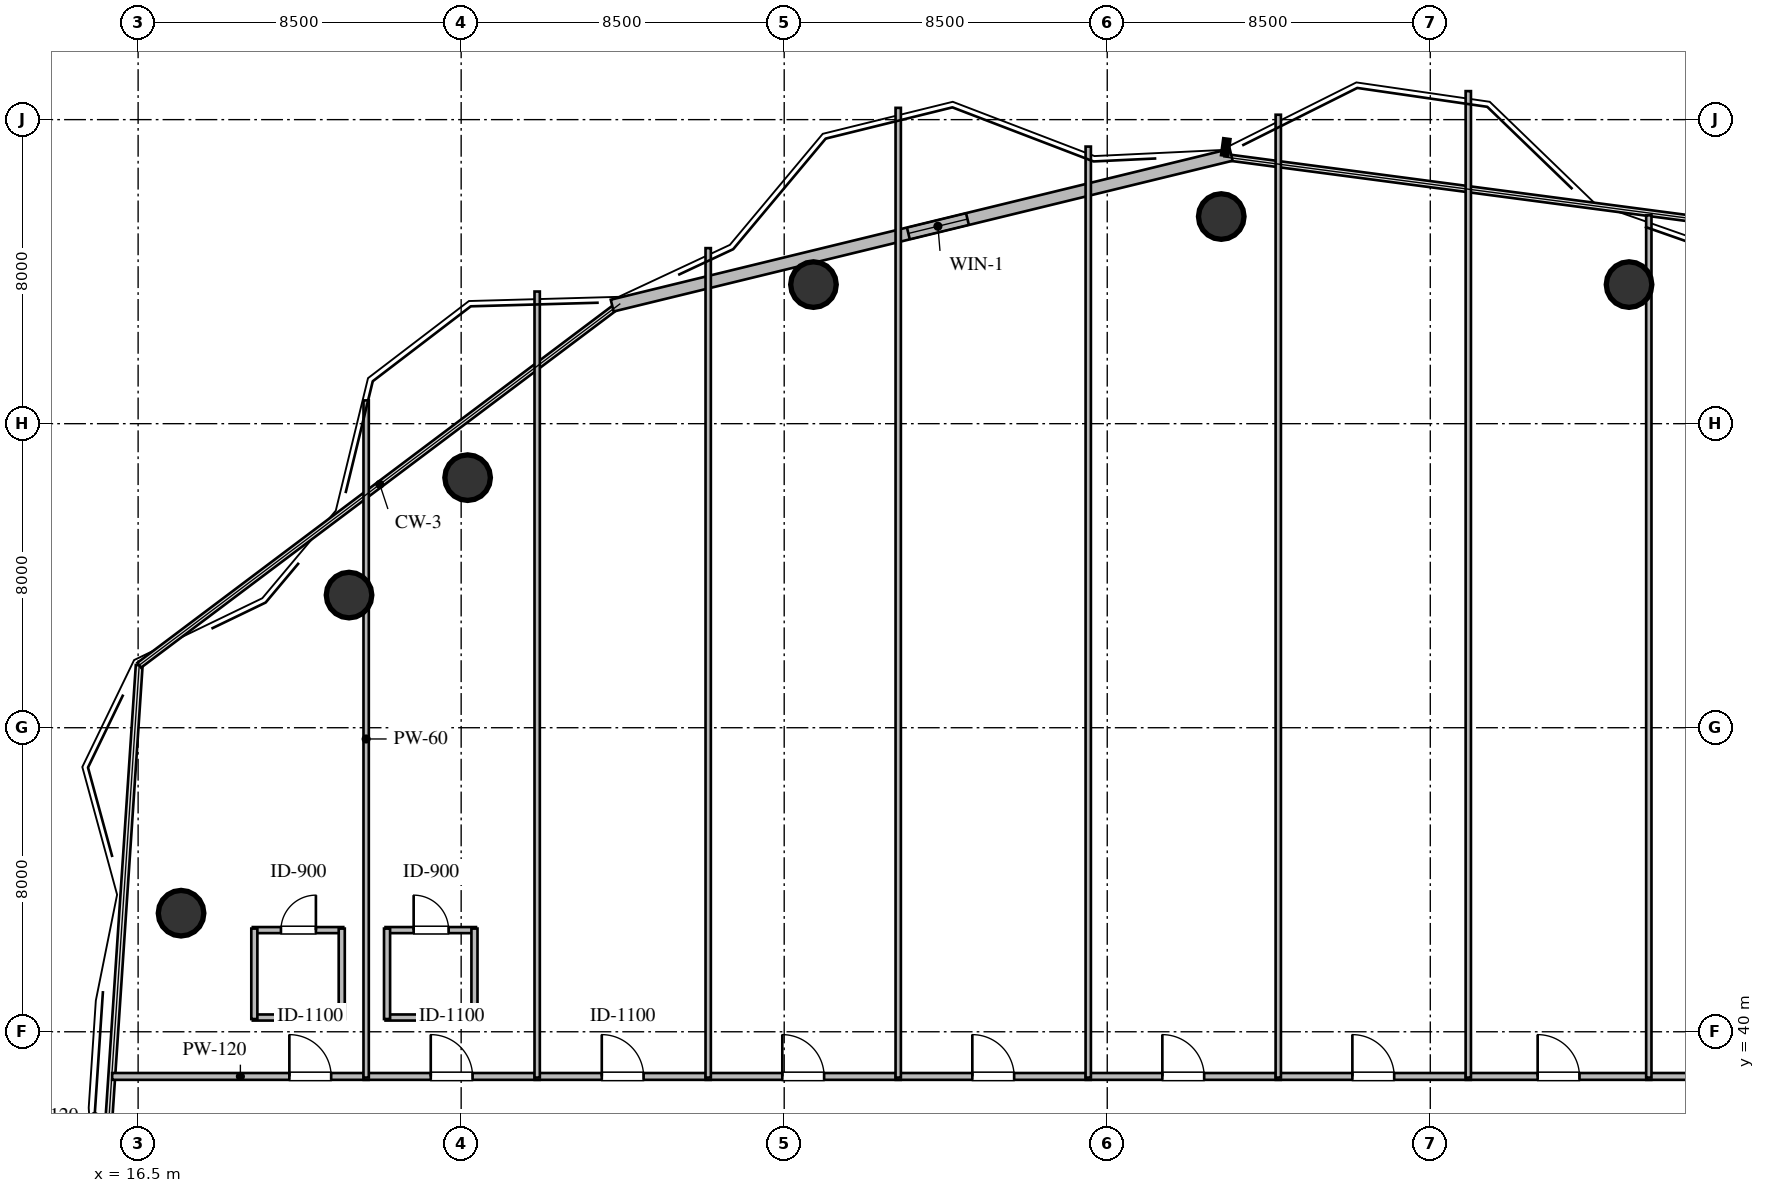
"""IFC4 building model, lengths in metres.
Left out: names, types, materials, properties, quantities, classifications, styles, units other than length and angle.
Written with IfcOpenShell. Run it as: python <this file> out.ifc"""

import sys

from ifc_helpers import new_model, si_unit, direction, frame, frame_2d, origin, origin_2d, place, context, subcontext, project, spatial, rectangle, circle, extrude, element, fill, save


model = new_model("IFC4")
c1 = context("Model", 3, precision=1e-05, world=origin(), true_north=direction((0.0, 1.0)))
c2 = subcontext(c1, "Body", "Model", "MODEL_VIEW")
j1 = project(units=[si_unit("LENGTHUNIT", "METRE"), si_unit("PLANEANGLEUNIT", "RADIAN")], contexts=[c1])
p1 = place(None, origin())
s1 = spatial("IfcSite", under=j1, at=p1, CompositionType="ELEMENT")
p2 = place(p1, origin())
s2 = spatial("IfcBuilding", under=s1, at=p2, CompositionType="ELEMENT")
p3 = place(p2, frame((0.0, 0.0, 131.4)))
s3 = spatial("IfcBuildingStorey", under=s2, at=p3, CompositionType="ELEMENT", Elevation=131.4)
for number, where, z_axis, x_axis in (
    (1, (55.73, 59.66, 0.0), (0.0, 0.0, 1.0), (1.0, 0.0, 0.0)),
    (2, (45.0, 61.45, 0.0), (0.0, 0.0, 1.0), (1.0, 0.0, 0.0)),
    (3, (34.27, 59.66, 0.0), (0.0, 0.0, 1.0), (1.0, 0.0, 0.0)),
    (4, (25.17, 54.58, 0.0), (0.0, 0.0, 1.0), (1.0, 0.0, 0.0)),
    (5, (22.05, 51.49, 0.0), (0.0, 0.0, 1.0), (1.0, 0.0, 0.0)),
    (6, (17.63, 43.12, 0.0), (0.0, 0.0, 1.0), (1.0, 0.0, 0.0)),
):
    element("IfcColumn", number, at=place(p3, frame(where, z_axis=z_axis, x_axis=x_axis)), inside=s3, PredefinedType="COLUMN", context=c2, shape_type="SweptSolid", body=[
        extrude(circle(Radius=0.6, at=origin_2d()), origin(), (0.0, 0.0, 1.0), 3.6),
    ])
p4 = place(p3, frame((28.974, 59.107, 0.0), z_axis=(0.0, 0.0, 1.0), x_axis=(0.971593971582, 0.236654081699, 0.0)))
e7 = element("IfcWall", 7, at=p4, inside=s3, PredefinedType="STANDARD", context=c2, shape_type="SweptSolid", body=[
    extrude(rectangle(XDim=16.763, YDim=0.32, at=frame_2d((8.381, 0.0))), origin(), (0.0, 0.0, 1.0), 3.36),
])
p5 = place(p4, frame((8.021, 0.0, 1.05)))
e8 = element("IfcOpeningElement", 8, at=p5, cuts=e7, PredefinedType="OPENING", context=c2, shape_type="SweptSolid", body=[
    extrude(rectangle(XDim=1.6, YDim=1.5, at=frame_2d((0.8, 0.75))), frame((0.0, 0.17, 0.0), z_axis=(0.0, -1.0, 0.0), x_axis=(1.0, 0.0, 0.0)), (0.0, 0.0, 1.0), 0.34),
])
p6 = place(p3, frame((19.518, 40.375, 0.0), z_axis=(0.0, 0.0, 1.0), x_axis=(1.0, 0.0, 0.0)))
e9 = element("IfcWall", 9, at=p6, inside=s3, PredefinedType="PLUMBINGWALL", context=c2, shape_type="SweptSolid", body=[
    extrude(rectangle(XDim=2.38, YDim=0.16, at=frame_2d((1.19, 0.0))), origin(), (0.0, 0.0, 1.0), 3.36),
])
p7 = place(p3, frame((19.518, 42.675, 0.0), z_axis=(0.0, 0.0, 1.0), x_axis=(1.0, 0.0, 0.0)))
e10 = element("IfcWall", 10, at=p7, inside=s3, PredefinedType="PLUMBINGWALL", context=c2, shape_type="SweptSolid", body=[
    extrude(rectangle(XDim=2.38, YDim=0.16, at=frame_2d((1.19, 0.0))), origin(), (0.0, 0.0, 1.0), 3.36),
])
p8 = place(p7, frame((0.74, 0.0, 0.0)))
e11 = element("IfcOpeningElement", 11, at=p8, cuts=e10, PredefinedType="OPENING", context=c2, shape_type="SweptSolid", body=[
    extrude(rectangle(XDim=0.92, YDim=2.1, at=frame_2d((0.46, 1.05))), frame((0.0, 0.09, 0.0), z_axis=(0.0, -1.0, 0.0), x_axis=(1.0, 0.0, 0.0)), (0.0, 0.0, 1.0), 0.18),
])
p9 = place(p3, frame((19.558, 40.335, 0.0), z_axis=(0.0, 0.0, 1.0), x_axis=(0.0, 1.0, 0.0)))
e12 = element("IfcWall", 12, at=p9, inside=s3, PredefinedType="PLUMBINGWALL", context=c2, shape_type="SweptSolid", body=[
    extrude(rectangle(XDim=2.38, YDim=0.16, at=frame_2d((1.19, 0.0))), origin(), (0.0, 0.0, 1.0), 3.36),
])
p10 = place(p3, frame((21.858, 40.335, 0.0), z_axis=(0.0, 0.0, 1.0), x_axis=(0.0, 1.0, 0.0)))
e13 = element("IfcWall", 13, at=p10, inside=s3, PredefinedType="PLUMBINGWALL", context=c2, shape_type="SweptSolid", body=[
    extrude(rectangle(XDim=2.38, YDim=0.16, at=frame_2d((1.19, 0.0))), origin(), (0.0, 0.0, 1.0), 2.806),
])
p11 = place(p3, frame((23.01, 40.375, 0.0), z_axis=(0.0, 0.0, 1.0), x_axis=(1.0, 0.0, 0.0)))
e14 = element("IfcWall", 14, at=p11, inside=s3, PredefinedType="PLUMBINGWALL", context=c2, shape_type="SweptSolid", body=[
    extrude(rectangle(XDim=2.38, YDim=0.16, at=frame_2d((1.19, 0.0))), origin(), (0.0, 0.0, 1.0), 3.36),
])
p12 = place(p3, frame((23.01, 42.675, 0.0), z_axis=(0.0, 0.0, 1.0), x_axis=(1.0, 0.0, 0.0)))
e15 = element("IfcWall", 15, at=p12, inside=s3, PredefinedType="PLUMBINGWALL", context=c2, shape_type="SweptSolid", body=[
    extrude(rectangle(XDim=2.38, YDim=0.16, at=frame_2d((1.19, 0.0))), origin(), (0.0, 0.0, 1.0), 3.36),
])
p13 = place(p12, frame((0.74, 0.0, 0.0)))
e16 = element("IfcOpeningElement", 16, at=p13, cuts=e15, PredefinedType="OPENING", context=c2, shape_type="SweptSolid", body=[
    extrude(rectangle(XDim=0.92, YDim=2.1, at=frame_2d((0.46, 1.05))), frame((0.0, 0.09, 0.0), z_axis=(0.0, -1.0, 0.0), x_axis=(1.0, 0.0, 0.0)), (0.0, 0.0, 1.0), 0.18),
])
p14 = place(p3, frame((23.05, 40.335, 0.0), z_axis=(0.0, 0.0, 1.0), x_axis=(0.0, 1.0, 0.0)))
e17 = element("IfcWall", 17, at=p14, inside=s3, PredefinedType="PLUMBINGWALL", context=c2, shape_type="SweptSolid", body=[
    extrude(rectangle(XDim=2.38, YDim=0.16, at=frame_2d((1.19, 0.0))), origin(), (0.0, 0.0, 1.0), 2.806),
])
p15 = place(p3, frame((25.35, 40.335, 0.0), z_axis=(0.0, 0.0, 1.0), x_axis=(0.0, 1.0, 0.0)))
e18 = element("IfcWall", 18, at=p15, inside=s3, PredefinedType="PLUMBINGWALL", context=c2, shape_type="SweptSolid", body=[
    extrude(rectangle(XDim=2.38, YDim=0.16, at=frame_2d((1.19, 0.0))), origin(), (0.0, 0.0, 1.0), 3.36),
])
p16 = place(p3, frame((15.817, 38.825, 0.0), z_axis=(0.0, 0.0, 1.0), x_axis=(1.0, 0.0, 0.0)))
e19 = element("IfcWall", 19, at=p16, inside=s3, PredefinedType="PARTITIONING", context=c2, shape_type="SweptSolid", body=[
    extrude(rectangle(XDim=6.748, YDim=0.18, at=frame_2d((3.374, 0.0))), origin(), (0.0, 0.0, 1.0), 3.36),
])
p17 = place(p16, frame((4.663, 0.0, 0.0)))
e20 = element("IfcOpeningElement", 20, at=p17, cuts=e19, PredefinedType="OPENING", context=c2, shape_type="SweptSolid", body=[
    extrude(rectangle(XDim=1.1, YDim=2.1, at=frame_2d((0.55, 1.05))), frame((0.0, 0.1, 0.0), z_axis=(0.0, -1.0, 0.0), x_axis=(1.0, 0.0, 0.0)), (0.0, 0.0, 1.0), 0.2),
])
p18 = place(p3, frame((22.435, 38.825, 0.0), z_axis=(0.0, 0.0, 1.0), x_axis=(1.0, 0.0, 0.0)))
e21 = element("IfcWall", 21, at=p18, inside=s3, PredefinedType="PARTITIONING", context=c2, shape_type="SweptSolid", body=[
    extrude(rectangle(XDim=4.63, YDim=0.18, at=frame_2d((2.315, 0.0))), origin(), (0.0, 0.0, 1.0), 3.36),
])
p19 = place(p18, frame((1.765, 0.0, 0.0)))
e22 = element("IfcOpeningElement", 22, at=p19, cuts=e21, PredefinedType="OPENING", context=c2, shape_type="SweptSolid", body=[
    extrude(rectangle(XDim=1.1, YDim=2.1, at=frame_2d((0.55, 1.05))), frame((0.0, 0.1, 0.0), z_axis=(0.0, -1.0, 0.0), x_axis=(1.0, 0.0, 0.0)), (0.0, 0.0, 1.0), 0.2),
])
p20 = place(p3, frame((26.935, 38.825, 0.0), z_axis=(0.0, 0.0, 1.0), x_axis=(1.0, 0.0, 0.0)))
e23 = element("IfcWall", 23, at=p20, inside=s3, PredefinedType="PARTITIONING", context=c2, shape_type="SweptSolid", body=[
    extrude(rectangle(XDim=4.63, YDim=0.18, at=frame_2d((2.315, 0.0))), origin(), (0.0, 0.0, 1.0), 3.36),
])
p21 = place(p20, frame((1.765, 0.0, 0.0)))
e24 = element("IfcOpeningElement", 24, at=p21, cuts=e23, PredefinedType="OPENING", context=c2, shape_type="SweptSolid", body=[
    extrude(rectangle(XDim=1.1, YDim=2.1, at=frame_2d((0.55, 1.05))), frame((0.0, 0.1, 0.0), z_axis=(0.0, -1.0, 0.0), x_axis=(1.0, 0.0, 0.0)), (0.0, 0.0, 1.0), 0.2),
])
p22 = place(p3, frame((31.435, 38.825, 0.0), z_axis=(0.0, 0.0, 1.0), x_axis=(1.0, 0.0, 0.0)))
e25 = element("IfcWall", 25, at=p22, inside=s3, PredefinedType="PARTITIONING", context=c2, shape_type="SweptSolid", body=[
    extrude(rectangle(XDim=5.13, YDim=0.18, at=frame_2d((2.565, 0.0))), origin(), (0.0, 0.0, 1.0), 3.36),
])
p23 = place(p22, frame((2.015, 0.0, 0.0)))
e26 = element("IfcOpeningElement", 26, at=p23, cuts=e25, PredefinedType="OPENING", context=c2, shape_type="SweptSolid", body=[
    extrude(rectangle(XDim=1.1, YDim=2.1, at=frame_2d((0.55, 1.05))), frame((0.0, 0.1, 0.0), z_axis=(0.0, -1.0, 0.0), x_axis=(1.0, 0.0, 0.0)), (0.0, 0.0, 1.0), 0.2),
])
p24 = place(p3, frame((36.435, 38.825, 0.0), z_axis=(0.0, 0.0, 1.0), x_axis=(1.0, 0.0, 0.0)))
e27 = element("IfcWall", 27, at=p24, inside=s3, PredefinedType="PARTITIONING", context=c2, shape_type="SweptSolid", body=[
    extrude(rectangle(XDim=5.13, YDim=0.18, at=frame_2d((2.565, 0.0))), origin(), (0.0, 0.0, 1.0), 3.36),
])
p25 = place(p24, frame((2.015, 0.0, 0.0)))
e28 = element("IfcOpeningElement", 28, at=p25, cuts=e27, PredefinedType="OPENING", context=c2, shape_type="SweptSolid", body=[
    extrude(rectangle(XDim=1.1, YDim=2.1, at=frame_2d((0.55, 1.05))), frame((0.0, 0.1, 0.0), z_axis=(0.0, -1.0, 0.0), x_axis=(1.0, 0.0, 0.0)), (0.0, 0.0, 1.0), 0.2),
])
p26 = place(p3, frame((41.435, 38.825, 0.0), z_axis=(0.0, 0.0, 1.0), x_axis=(1.0, 0.0, 0.0)))
e29 = element("IfcWall", 29, at=p26, inside=s3, PredefinedType="PARTITIONING", context=c2, shape_type="SweptSolid", body=[
    extrude(rectangle(XDim=5.13, YDim=0.18, at=frame_2d((2.565, 0.0))), origin(), (0.0, 0.0, 1.0), 3.36),
])
p27 = place(p26, frame((2.015, 0.0, 0.0)))
e30 = element("IfcOpeningElement", 30, at=p27, cuts=e29, PredefinedType="OPENING", context=c2, shape_type="SweptSolid", body=[
    extrude(rectangle(XDim=1.1, YDim=2.1, at=frame_2d((0.55, 1.05))), frame((0.0, 0.1, 0.0), z_axis=(0.0, -1.0, 0.0), x_axis=(1.0, 0.0, 0.0)), (0.0, 0.0, 1.0), 0.2),
])
p28 = place(p3, frame((46.435, 38.825, 0.0), z_axis=(0.0, 0.0, 1.0), x_axis=(1.0, 0.0, 0.0)))
e31 = element("IfcWall", 31, at=p28, inside=s3, PredefinedType="PARTITIONING", context=c2, shape_type="SweptSolid", body=[
    extrude(rectangle(XDim=5.13, YDim=0.18, at=frame_2d((2.565, 0.0))), origin(), (0.0, 0.0, 1.0), 3.36),
])
p29 = place(p28, frame((2.015, 0.0, 0.0)))
e32 = element("IfcOpeningElement", 32, at=p29, cuts=e31, PredefinedType="OPENING", context=c2, shape_type="SweptSolid", body=[
    extrude(rectangle(XDim=1.1, YDim=2.1, at=frame_2d((0.55, 1.05))), frame((0.0, 0.1, 0.0), z_axis=(0.0, -1.0, 0.0), x_axis=(1.0, 0.0, 0.0)), (0.0, 0.0, 1.0), 0.2),
])
p30 = place(p3, frame((51.435, 38.825, 0.0), z_axis=(0.0, 0.0, 1.0), x_axis=(1.0, 0.0, 0.0)))
e33 = element("IfcWall", 33, at=p30, inside=s3, PredefinedType="PARTITIONING", context=c2, shape_type="SweptSolid", body=[
    extrude(rectangle(XDim=4.88, YDim=0.18, at=frame_2d((2.44, 0.0))), origin(), (0.0, 0.0, 1.0), 3.36),
])
p31 = place(p30, frame((1.89, 0.0, 0.0)))
e34 = element("IfcOpeningElement", 34, at=p31, cuts=e33, PredefinedType="OPENING", context=c2, shape_type="SweptSolid", body=[
    extrude(rectangle(XDim=1.1, YDim=2.1, at=frame_2d((0.55, 1.05))), frame((0.0, 0.1, 0.0), z_axis=(0.0, -1.0, 0.0), x_axis=(1.0, 0.0, 0.0)), (0.0, 0.0, 1.0), 0.2),
])
p32 = place(p3, frame((56.185, 38.825, 0.0), z_axis=(0.0, 0.0, 1.0), x_axis=(1.0, 0.0, 0.0)))
e35 = element("IfcWall", 35, at=p32, inside=s3, PredefinedType="PARTITIONING", context=c2, shape_type="SweptSolid", body=[
    extrude(rectangle(XDim=4.88, YDim=0.18, at=frame_2d((2.44, 0.0))), origin(), (0.0, 0.0, 1.0), 3.36),
])
p33 = place(p32, frame((1.89, 0.0, 0.0)))
e36 = element("IfcOpeningElement", 36, at=p33, cuts=e35, PredefinedType="OPENING", context=c2, shape_type="SweptSolid", body=[
    extrude(rectangle(XDim=1.1, YDim=2.1, at=frame_2d((0.55, 1.05))), frame((0.0, 0.1, 0.0), z_axis=(0.0, -1.0, 0.0), x_axis=(1.0, 0.0, 0.0)), (0.0, 0.0, 1.0), 0.2),
])
p34 = place(p3, frame((22.5, 56.613, 0.0), z_axis=(0.0, 0.0, 1.0), x_axis=(0.0, -1.0, 0.0)))
e37 = element("IfcWall", 37, at=p34, inside=s3, PredefinedType="PARTITIONING", context=c2, shape_type="SweptSolid", body=[
    extrude(rectangle(XDim=17.818, YDim=0.14, at=frame_2d((8.909, 0.0))), origin(), (0.0, 0.0, 1.0), 2.806),
])
p35 = place(p3, frame((27.0, 59.477, 0.0), z_axis=(0.0, 0.0, 1.0), x_axis=(0.0, -1.0, 0.0)))
e38 = element("IfcWall", 38, at=p35, inside=s3, PredefinedType="PARTITIONING", context=c2, shape_type="SweptSolid", body=[
    extrude(rectangle(XDim=20.682, YDim=0.14, at=frame_2d((10.341, 0.0))), origin(), (0.0, 0.0, 1.0), 3.36),
])
p36 = place(p3, frame((31.5, 60.619, 0.0), z_axis=(0.0, 0.0, 1.0), x_axis=(0.0, -1.0, 0.0)))
e39 = element("IfcWall", 39, at=p36, inside=s3, PredefinedType="PARTITIONING", context=c2, shape_type="SweptSolid", body=[
    extrude(rectangle(XDim=21.824, YDim=0.14, at=frame_2d((10.912, 0.0))), origin(), (0.0, 0.0, 1.0), 3.36),
])
p37 = place(p3, frame((36.5, 64.31, 0.0), z_axis=(0.0, 0.0, 1.0), x_axis=(0.0, -1.0, 0.0)))
e40 = element("IfcWall", 40, at=p37, inside=s3, PredefinedType="PARTITIONING", context=c2, shape_type="SweptSolid", body=[
    extrude(rectangle(XDim=25.515, YDim=0.14, at=frame_2d((12.758, 0.0))), origin(), (0.0, 0.0, 1.0), 3.36),
])
p38 = place(p3, frame((41.5, 63.291, 0.0), z_axis=(0.0, 0.0, 1.0), x_axis=(0.0, -1.0, 0.0)))
e41 = element("IfcWall", 41, at=p38, inside=s3, PredefinedType="PARTITIONING", context=c2, shape_type="SweptSolid", body=[
    extrude(rectangle(XDim=24.496, YDim=0.14, at=frame_2d((12.248, 0.0))), origin(), (0.0, 0.0, 1.0), 3.36),
])
p39 = place(p3, frame((46.5, 64.129, 0.0), z_axis=(0.0, 0.0, 1.0), x_axis=(0.0, -1.0, 0.0)))
e42 = element("IfcWall", 42, at=p39, inside=s3, PredefinedType="PARTITIONING", context=c2, shape_type="SweptSolid", body=[
    extrude(rectangle(XDim=25.334, YDim=0.14, at=frame_2d((12.667, 0.0))), origin(), (0.0, 0.0, 1.0), 3.36),
])
p40 = place(p3, frame((51.5, 64.75, 0.0), z_axis=(0.0, 0.0, 1.0), x_axis=(0.0, -1.0, 0.0)))
e43 = element("IfcWall", 43, at=p40, inside=s3, PredefinedType="PARTITIONING", context=c2, shape_type="SweptSolid", body=[
    extrude(rectangle(XDim=25.955, YDim=0.14, at=frame_2d((12.978, 0.0))), origin(), (0.0, 0.0, 1.0), 3.36),
])
p41 = place(p3, frame((56.25, 61.482, 0.0), z_axis=(0.0, 0.0, 1.0), x_axis=(0.0, -1.0, 0.0)))
e44 = element("IfcWall", 44, at=p41, inside=s3, PredefinedType="PARTITIONING", context=c2, shape_type="SweptSolid", body=[
    extrude(rectangle(XDim=22.687, YDim=0.14, at=frame_2d((11.344, 0.0))), origin(), (0.0, 0.0, 1.0), 3.36),
])
p42 = place(p5, origin())
e45 = element("IfcWindow", 45, at=p42, inside=s3, PartitioningType="SINGLE_PANEL", PredefinedType="WINDOW", context=c2, shape_type="SweptSolid", body=[
    extrude(rectangle(XDim=1.6, YDim=1.5, at=frame_2d((0.8, 0.75))), frame((0.0, 0.03, 0.0), z_axis=(0.0, -1.0, 0.0), x_axis=(1.0, 0.0, 0.0)), (0.0, 0.0, 1.0), 0.06),
])
fill(e8, e45)
p43 = place(p8, origin())
e46 = element("IfcDoor", 46, at=p43, inside=s3, OperationType="SINGLE_SWING_RIGHT", PredefinedType="DOOR", context=c2, shape_type="SweptSolid", body=[
    extrude(rectangle(XDim=0.92, YDim=2.1, at=frame_2d((0.46, 1.05))), frame((0.0, 0.025, 0.0), z_axis=(0.0, -1.0, 0.0), x_axis=(1.0, 0.0, 0.0)), (0.0, 0.0, 1.0), 0.05),
])
fill(e11, e46)
p44 = place(p13, origin())
e47 = element("IfcDoor", 47, at=p44, inside=s3, OperationType="SINGLE_SWING_LEFT", PredefinedType="DOOR", context=c2, shape_type="SweptSolid", body=[
    extrude(rectangle(XDim=0.92, YDim=2.1, at=frame_2d((0.46, 1.05))), frame((0.0, 0.025, 0.0), z_axis=(0.0, -1.0, 0.0), x_axis=(1.0, 0.0, 0.0)), (0.0, 0.0, 1.0), 0.05),
])
fill(e16, e47)
p45 = place(p17, origin())
e48 = element("IfcDoor", 48, at=p45, inside=s3, OperationType="SINGLE_SWING_LEFT", PredefinedType="DOOR", context=c2, shape_type="SweptSolid", body=[
    extrude(rectangle(XDim=1.1, YDim=2.1, at=frame_2d((0.55, 1.05))), frame((0.0, 0.025, 0.0), z_axis=(0.0, -1.0, 0.0), x_axis=(1.0, 0.0, 0.0)), (0.0, 0.0, 1.0), 0.05),
])
fill(e20, e48)
p46 = place(p19, origin())
e49 = element("IfcDoor", 49, at=p46, inside=s3, OperationType="SINGLE_SWING_LEFT", PredefinedType="DOOR", context=c2, shape_type="SweptSolid", body=[
    extrude(rectangle(XDim=1.1, YDim=2.1, at=frame_2d((0.55, 1.05))), frame((0.0, 0.025, 0.0), z_axis=(0.0, -1.0, 0.0), x_axis=(1.0, 0.0, 0.0)), (0.0, 0.0, 1.0), 0.05),
])
fill(e22, e49)
p47 = place(p21, origin())
e50 = element("IfcDoor", 50, at=p47, inside=s3, OperationType="SINGLE_SWING_LEFT", PredefinedType="DOOR", context=c2, shape_type="SweptSolid", body=[
    extrude(rectangle(XDim=1.1, YDim=2.1, at=frame_2d((0.55, 1.05))), frame((0.0, 0.025, 0.0), z_axis=(0.0, -1.0, 0.0), x_axis=(1.0, 0.0, 0.0)), (0.0, 0.0, 1.0), 0.05),
])
fill(e24, e50)
p48 = place(p23, origin())
e51 = element("IfcDoor", 51, at=p48, inside=s3, OperationType="SINGLE_SWING_LEFT", PredefinedType="DOOR", context=c2, shape_type="SweptSolid", body=[
    extrude(rectangle(XDim=1.1, YDim=2.1, at=frame_2d((0.55, 1.05))), frame((0.0, 0.025, 0.0), z_axis=(0.0, -1.0, 0.0), x_axis=(1.0, 0.0, 0.0)), (0.0, 0.0, 1.0), 0.05),
])
fill(e26, e51)
p49 = place(p25, origin())
e52 = element("IfcDoor", 52, at=p49, inside=s3, OperationType="SINGLE_SWING_LEFT", PredefinedType="DOOR", context=c2, shape_type="SweptSolid", body=[
    extrude(rectangle(XDim=1.1, YDim=2.1, at=frame_2d((0.55, 1.05))), frame((0.0, 0.025, 0.0), z_axis=(0.0, -1.0, 0.0), x_axis=(1.0, 0.0, 0.0)), (0.0, 0.0, 1.0), 0.05),
])
fill(e28, e52)
p50 = place(p27, origin())
e53 = element("IfcDoor", 53, at=p50, inside=s3, OperationType="SINGLE_SWING_LEFT", PredefinedType="DOOR", context=c2, shape_type="SweptSolid", body=[
    extrude(rectangle(XDim=1.1, YDim=2.1, at=frame_2d((0.55, 1.05))), frame((0.0, 0.025, 0.0), z_axis=(0.0, -1.0, 0.0), x_axis=(1.0, 0.0, 0.0)), (0.0, 0.0, 1.0), 0.05),
])
fill(e30, e53)
p51 = place(p29, origin())
e54 = element("IfcDoor", 54, at=p51, inside=s3, OperationType="SINGLE_SWING_LEFT", PredefinedType="DOOR", context=c2, shape_type="SweptSolid", body=[
    extrude(rectangle(XDim=1.1, YDim=2.1, at=frame_2d((0.55, 1.05))), frame((0.0, 0.025, 0.0), z_axis=(0.0, -1.0, 0.0), x_axis=(1.0, 0.0, 0.0)), (0.0, 0.0, 1.0), 0.05),
])
fill(e32, e54)
p52 = place(p31, origin())
e55 = element("IfcDoor", 55, at=p52, inside=s3, OperationType="SINGLE_SWING_LEFT", PredefinedType="DOOR", context=c2, shape_type="SweptSolid", body=[
    extrude(rectangle(XDim=1.1, YDim=2.1, at=frame_2d((0.55, 1.05))), frame((0.0, 0.025, 0.0), z_axis=(0.0, -1.0, 0.0), x_axis=(1.0, 0.0, 0.0)), (0.0, 0.0, 1.0), 0.05),
])
fill(e34, e55)
save(model, sys.argv[1])
